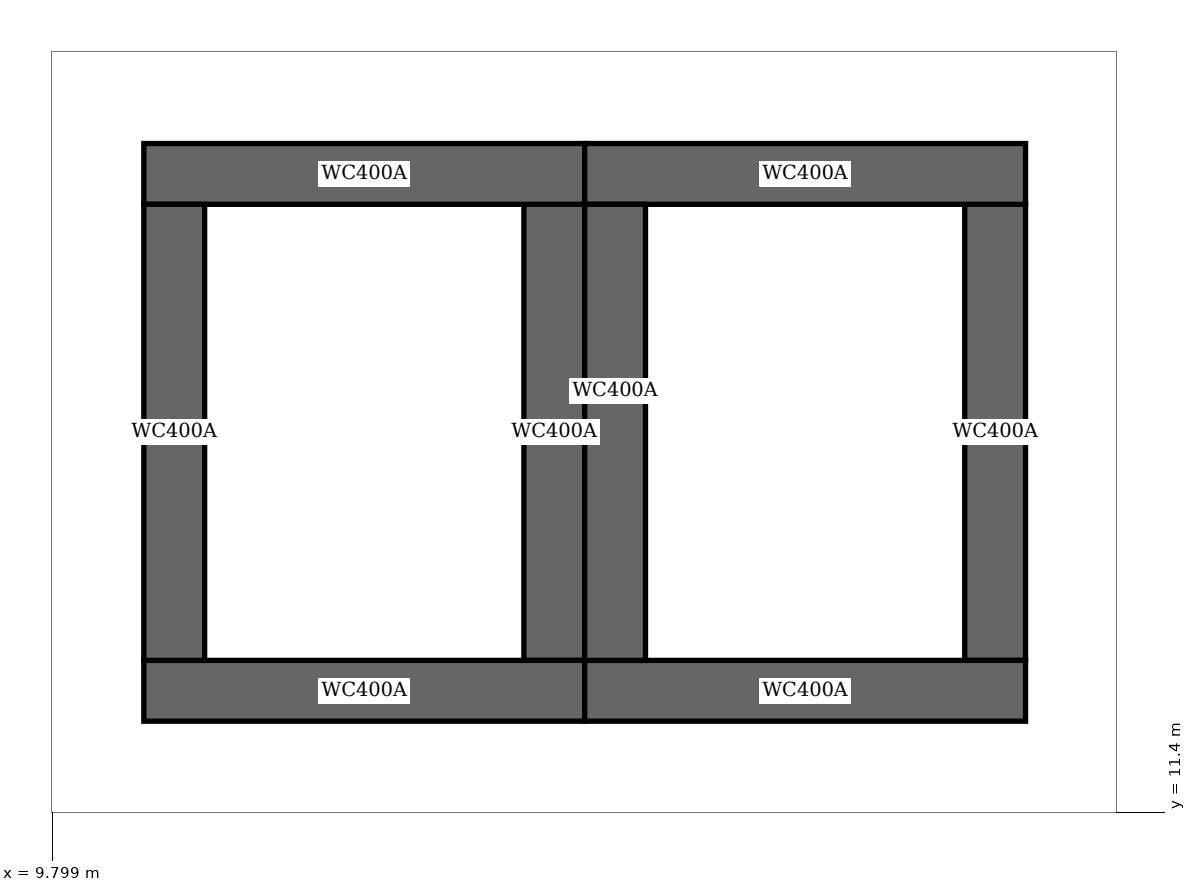
"""IFC4 building model, lengths in metres.
Left out: names, types, materials, properties, quantities, classifications, styles, units other than length and angle.
Written with IfcOpenShell. Run it as: python <this file> out.ifc"""

import sys

from ifc_helpers import new_model, si_unit, direction, frame, frame_2d, origin, place, context, subcontext, project, spatial, rectangle, extrude, element, save


model = new_model("IFC4")
c1 = context("Model", 3, precision=1e-05, world=origin(), true_north=direction((0.0, 1.0)))
c2 = subcontext(c1, "Body", "Model", "MODEL_VIEW")
j1 = project(units=[si_unit("LENGTHUNIT", "METRE"), si_unit("PLANEANGLEUNIT", "RADIAN")], contexts=[c1])
p1 = place(None, origin())
s1 = spatial("IfcSite", under=j1, at=p1, CompositionType="ELEMENT")
p2 = place(p1, origin())
s2 = spatial("IfcBuilding", under=s1, at=p2, CompositionType="ELEMENT")
p3 = place(p2, frame((0.0, 0.0, -5.5)))
s3 = spatial("IfcBuildingStorey", under=s2, at=p3, CompositionType="ELEMENT", Elevation=-5.5)
for number, where, z_axis, x_axis in (
    (1, (10.4, 12.2, 0.0), (0.0, 0.0, 1.0), (1.0, 0.0, 0.0)),
    (2, (10.4, 15.6, 0.0), (0.0, 0.0, 1.0), (1.0, 0.0, 0.0)),
):
    element("IfcWall", number, at=place(p3, frame(where, z_axis=z_axis, x_axis=x_axis)), inside=s3, PredefinedType="SHEAR", context=c2, shape_type="SweptSolid", body=[
        extrude(rectangle(XDim=2.9, YDim=0.4, at=frame_2d((1.45, 0.0))), origin(), (0.0, 0.0, 1.0), 5.5),
    ])
for number, where, z_axis, x_axis in (
    (3, (10.6, 12.4, 0.0), (0.0, 0.0, 1.0), (0.0, 1.0, 0.0)),
    (4, (13.1, 12.4, 0.0), (0.0, 0.0, 1.0), (0.0, 1.0, 0.0)),
):
    element("IfcWall", number, at=place(p3, frame(where, z_axis=z_axis, x_axis=x_axis)), inside=s3, PredefinedType="SHEAR", context=c2, shape_type="SweptSolid", body=[
        extrude(rectangle(XDim=3.0, YDim=0.4, at=frame_2d((1.5, 0.0))), origin(), (0.0, 0.0, 1.0), 5.5),
    ])
for number, where, z_axis, x_axis in (
    (5, (13.3, 12.2, 0.0), (0.0, 0.0, 1.0), (1.0, 0.0, 0.0)),
    (6, (13.3, 15.6, 0.0), (0.0, 0.0, 1.0), (1.0, 0.0, 0.0)),
):
    element("IfcWall", number, at=place(p3, frame(where, z_axis=z_axis, x_axis=x_axis)), inside=s3, PredefinedType="SHEAR", context=c2, shape_type="SweptSolid", body=[
        extrude(rectangle(XDim=2.9, YDim=0.4, at=frame_2d((1.45, 0.0))), origin(), (0.0, 0.0, 1.0), 5.5),
    ])
for number, where, z_axis, x_axis in (
    (7, (13.5, 12.4, 0.0), (0.0, 0.0, 1.0), (0.0, 1.0, 0.0)),
    (8, (16.0, 12.4, 0.0), (0.0, 0.0, 1.0), (0.0, 1.0, 0.0)),
):
    element("IfcWall", number, at=place(p3, frame(where, z_axis=z_axis, x_axis=x_axis)), inside=s3, PredefinedType="SHEAR", context=c2, shape_type="SweptSolid", body=[
        extrude(rectangle(XDim=3.0, YDim=0.4, at=frame_2d((1.5, 0.0))), origin(), (0.0, 0.0, 1.0), 5.5),
    ])
save(model, sys.argv[1])
